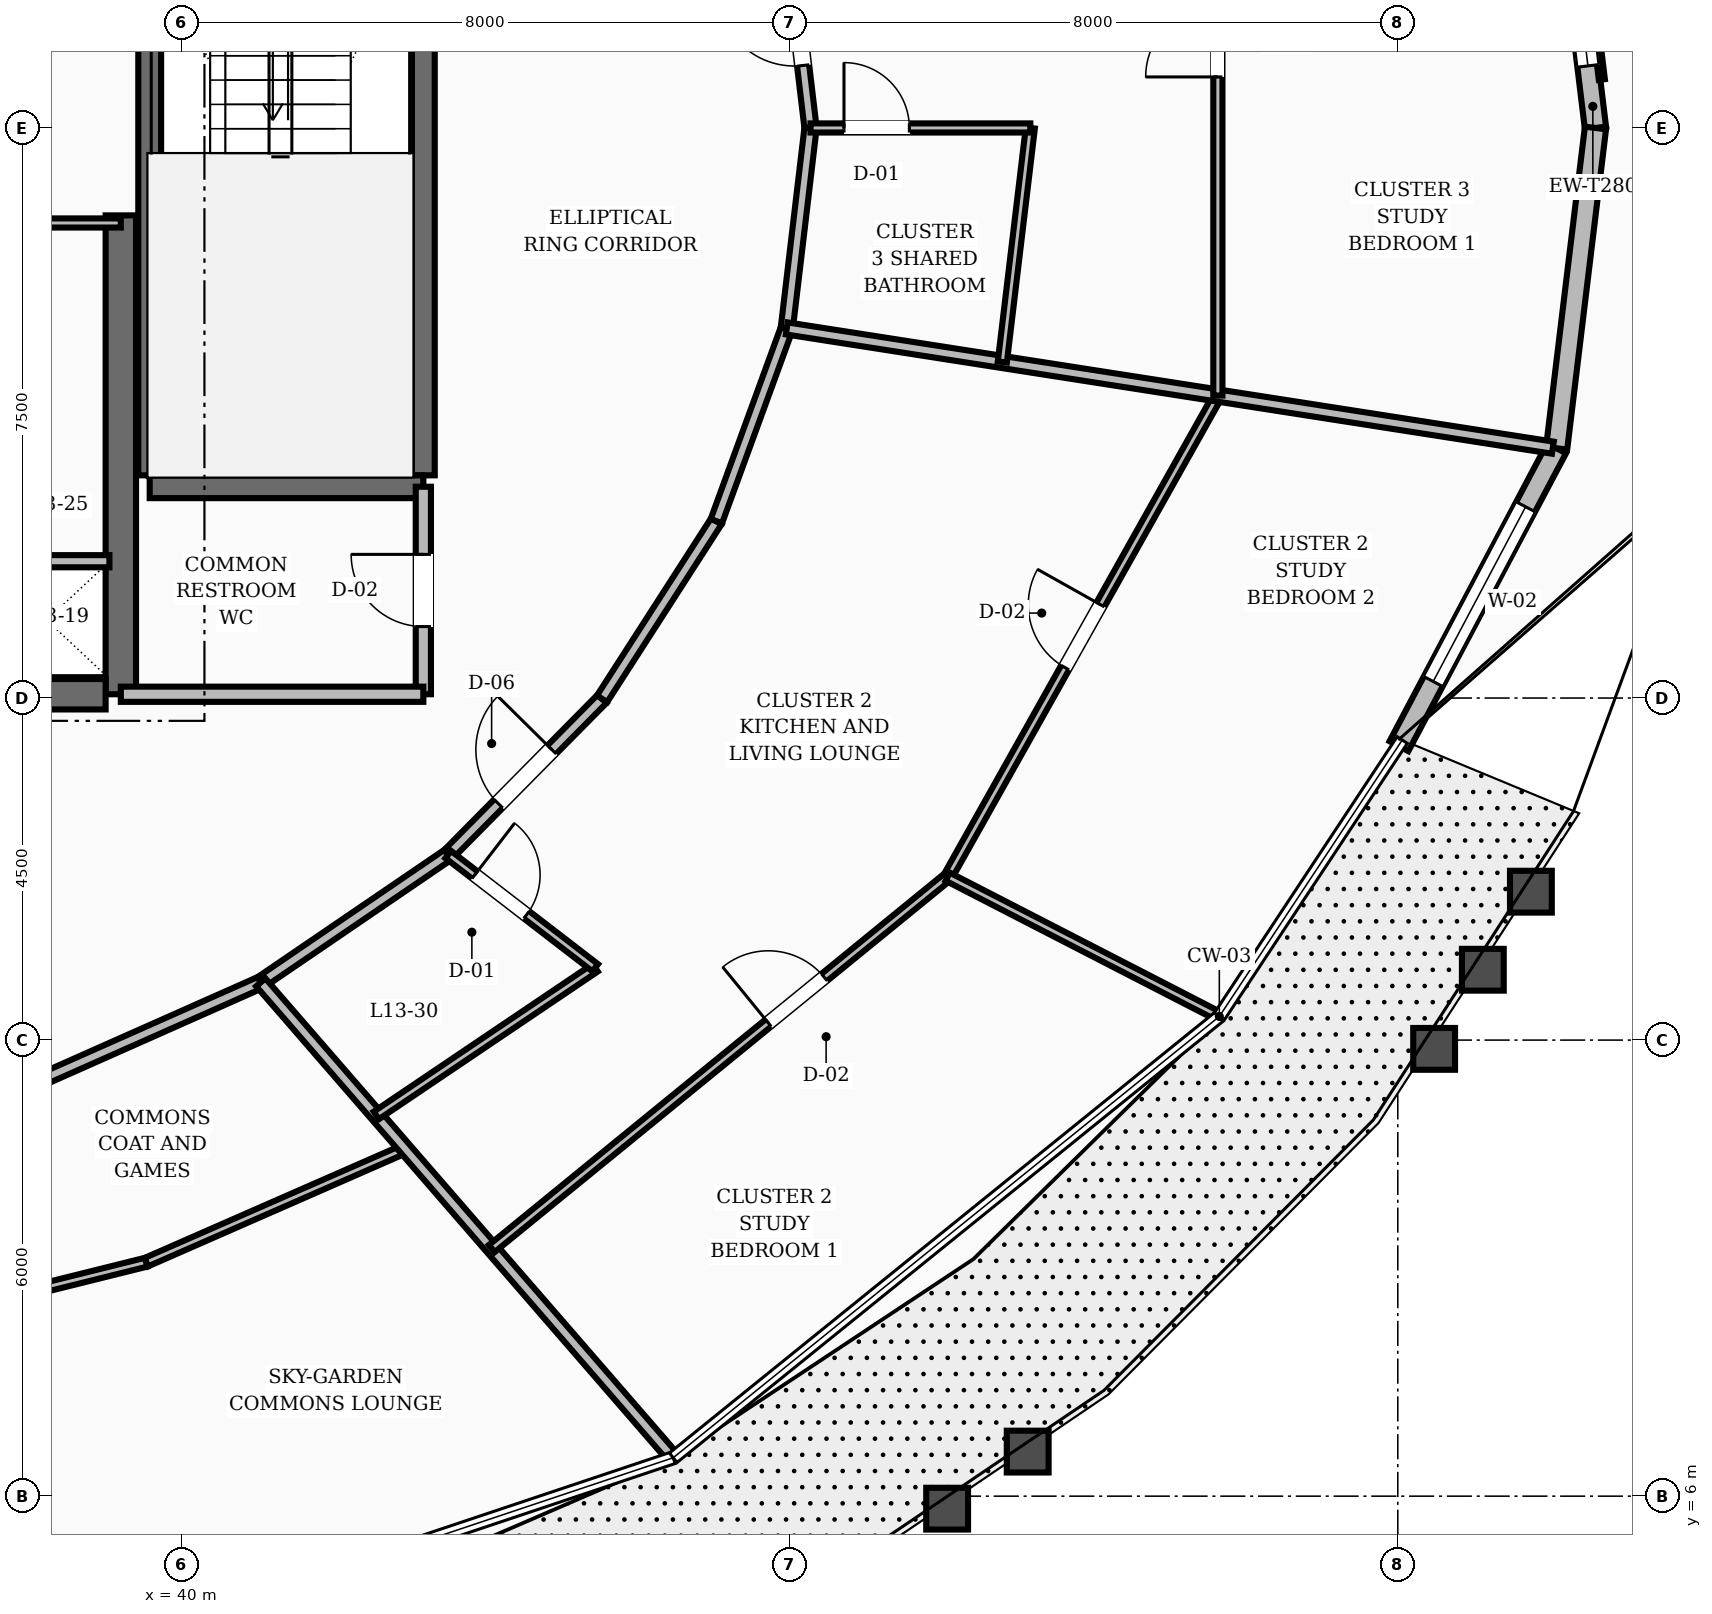
"""IFC4 building model, lengths in metres.
Left out: names, types, materials, properties, quantities, classifications, styles, units other than length and angle.
Written with IfcOpenShell. Run it as: python <this file> out.ifc"""

import sys

from ifc_helpers import new_model, si_unit, direction, frame, frame_2d, origin, place, context, subcontext, project, spatial, rectangle, extrude, element, fill, save


model = new_model("IFC4")
c1 = context("Model", 3, precision=1e-05, world=origin(), true_north=direction((0.0, 1.0)))
c2 = subcontext(c1, "Body", "Model", "MODEL_VIEW")
j1 = project(units=[si_unit("LENGTHUNIT", "METRE"), si_unit("PLANEANGLEUNIT", "RADIAN")], contexts=[c1])
p1 = place(None, origin())
s1 = spatial("IfcSite", under=j1, at=p1, CompositionType="ELEMENT")
p2 = place(p1, origin())
s2 = spatial("IfcBuilding", under=s1, at=p2, CompositionType="ELEMENT")
p3 = place(p2, frame((0.0, 0.0, 55.6)))
s3 = spatial("IfcBuildingStorey", under=s2, at=p3, CompositionType="ELEMENT", Elevation=55.6)
p4 = place(p3, frame((39.2, 16.55, 0.0), z_axis=(0.0, 0.0, 1.0), x_axis=(0.0, 1.0, 0.0)))
e1 = element("IfcWall", 1, at=p4, inside=s3, PredefinedType="SHEAR", context=c2, shape_type="SweptSolid", body=[
    extrude(rectangle(XDim=6.3, YDim=0.4, at=frame_2d((3.15, 0.0))), origin(), (0.0, 0.0, 1.0), 3.6),
])
p5 = place(p3, frame((35.8, 16.55, 0.0), z_axis=(0.0, 0.0, 1.0), x_axis=(1.0, 0.0, 0.0)))
e2 = element("IfcWall", 2, at=p5, inside=s3, PredefinedType="SHEAR", context=c2, shape_type="SweptSolid", body=[
    extrude(rectangle(XDim=3.2, YDim=0.4, at=frame_2d((1.6, 0.0))), origin(), (0.0, 0.0, 1.0), 3.6),
])
p6 = place(p5, frame((0.3, 0.0, 0.0)))
e3 = element("IfcOpeningElement", 3, at=p6, cuts=e2, PredefinedType="OPENING", context=c2, shape_type="SweptSolid", body=[
    extrude(rectangle(XDim=1.1, YDim=2.1, at=frame_2d((0.55, 1.05))), frame((0.0, 0.21, 0.0), z_axis=(0.0, -1.0, 0.0), x_axis=(1.0, 0.0, 0.0)), (0.0, 0.0, 1.0), 0.42),
])
for number, where, z_axis, x_axis in (
    (4, (43.18, 19.43, 0.0), (0.0, 0.0, 1.0), (0.0, 1.0, 0.0)),
    (5, (39.58, 19.43, 0.0), (0.0, 0.0, 1.0), (0.0, 1.0, 0.0)),
):
    element("IfcWall", number, at=place(p3, frame(where, z_axis=z_axis, x_axis=x_axis)), inside=s3, PredefinedType="SHEAR", context=c2, shape_type="SweptSolid", body=[
        extrude(rectangle(XDim=8.74, YDim=0.3, at=frame_2d((4.37, 0.0))), origin(), (0.0, 0.0, 1.0), 3.6),
    ])
p7 = place(p3, frame((39.58, 19.28, 0.0), z_axis=(0.0, 0.0, 1.0), x_axis=(1.0, 0.0, 0.0)))
e6 = element("IfcWall", 6, at=p7, inside=s3, PredefinedType="SHEAR", context=c2, shape_type="SweptSolid", body=[
    extrude(rectangle(XDim=3.6, YDim=0.3, at=frame_2d((1.8, 0.0))), origin(), (0.0, 0.0, 1.0), 3.6),
])
p8 = place(p3, frame((58.601, 24.0, 0.0), z_axis=(0.0, 0.0, 1.0), x_axis=(-0.120374306833, 0.992728576326, 0.0)))
e7 = element("IfcWall", 7, at=p8, inside=s3, PredefinedType="STANDARD", context=c2, shape_type="SweptSolid", body=[
    extrude(rectangle(XDim=4.245, YDim=0.28, at=frame_2d((2.123, 0.0))), origin(), (0.0, 0.0, 1.0), 2.65),
])
p9 = place(p8, frame((0.823, 0.0, 0.8)))
e8 = element("IfcOpeningElement", 8, at=p9, cuts=e7, PredefinedType="OPENING", context=c2, shape_type="SweptSolid", body=[
    extrude(rectangle(XDim=2.6, YDim=1.65, at=frame_2d((1.3, 0.825))), frame((0.0, 0.15, 0.0), z_axis=(0.0, -1.0, 0.0), x_axis=(1.0, 0.0, 0.0)), (0.0, 0.0, 1.0), 0.3),
])
p10 = place(p3, frame((56.015, 15.867, 0.0), z_axis=(0.0, 0.0, 1.0), x_axis=(0.467773880132, 0.883848175348, 0.0)))
e9 = element("IfcWall", 9, at=p10, inside=s3, PredefinedType="STANDARD", context=c2, shape_type="SweptSolid", body=[
    extrude(rectangle(XDim=4.434, YDim=0.28, at=frame_2d((2.217, 0.0))), origin(), (0.0, 0.0, 1.0), 2.65),
])
p11 = place(p10, frame((0.963, 0.0, 0.8)))
e10 = element("IfcOpeningElement", 10, at=p11, cuts=e9, PredefinedType="OPENING", context=c2, shape_type="SweptSolid", body=[
    extrude(rectangle(XDim=2.6, YDim=1.65, at=frame_2d((1.3, 0.825))), frame((0.0, 0.15, 0.0), z_axis=(0.0, -1.0, 0.0), x_axis=(1.0, 0.0, 0.0)), (0.0, 0.0, 1.0), 0.3),
])
p12 = place(p3, frame((58.09, 19.786, 0.0), z_axis=(0.0, 0.0, 1.0), x_axis=(0.120374306833, 0.992728576326, 0.0)))
e11 = element("IfcWall", 11, at=p12, inside=s3, PredefinedType="STANDARD", context=c2, shape_type="SweptSolid", body=[
    extrude(rectangle(XDim=4.245, YDim=0.28, at=frame_2d((2.123, 0.0))), origin(), (0.0, 0.0, 1.0), 2.65),
])
p13 = place(p3, frame((43.18, 16.55, 0.0), z_axis=(0.0, 0.0, 1.0), x_axis=(0.0, 1.0, 0.0)))
e12 = element("IfcWall", 12, at=p13, inside=s3, PredefinedType="SOLIDWALL", context=c2, shape_type="SweptSolid", body=[
    extrude(rectangle(XDim=2.73, YDim=0.2, at=frame_2d((1.365, 0.0))), origin(), (0.0, 0.0, 1.0), 2.61),
])
p14 = place(p13, frame((0.89, 0.0, 0.0)))
e13 = element("IfcOpeningElement", 13, at=p14, cuts=e12, PredefinedType="OPENING", context=c2, shape_type="SweptSolid", body=[
    extrude(rectangle(XDim=0.95, YDim=2.1, at=frame_2d((0.475, 1.05))), frame((0.0, 0.11, 0.0), z_axis=(0.0, -1.0, 0.0), x_axis=(1.0, 0.0, 0.0)), (0.0, 0.0, 1.0), 0.22),
])
p15 = place(p3, frame((39.2, 16.55, 0.0), z_axis=(0.0, 0.0, 1.0), x_axis=(1.0, 0.0, 0.0)))
e14 = element("IfcWall", 14, at=p15, inside=s3, PredefinedType="SOLIDWALL", context=c2, shape_type="SweptSolid", body=[
    extrude(rectangle(XDim=3.98, YDim=0.2, at=frame_2d((1.99, 0.0))), origin(), (0.0, 0.0, 1.0), 2.61),
])
p16 = place(p3, frame((37.4, 18.3, 0.0), z_axis=(0.0, 0.0, 1.0), x_axis=(1.0, 0.0, 0.0)))
e15 = element("IfcWall", 15, at=p16, inside=s3, PredefinedType="SOLIDWALL", context=c2, shape_type="SweptSolid", body=[
    extrude(rectangle(XDim=1.65, YDim=0.16, at=frame_2d((0.825, 0.0))), origin(), (0.0, 0.0, 1.0), 2.61),
])
p17 = place(p3, frame((37.4, 22.75, 0.0), z_axis=(0.0, 0.0, 1.0), x_axis=(1.0, 0.0, 0.0)))
e16 = element("IfcWall", 16, at=p17, inside=s3, PredefinedType="PARTITIONING", context=c2, shape_type="SweptSolid", body=[
    extrude(rectangle(XDim=1.8, YDim=0.12, at=frame_2d((0.9, 0.0))), origin(), (0.0, 0.0, 1.0), 2.61),
])
p18 = place(p3, frame((48.274, 24.0, 0.0), z_axis=(0.0, 0.0, 1.0), x_axis=(-0.117763961213, 0.99304161516, 0.0)))
e17 = element("IfcWall", 17, at=p18, inside=s3, PredefinedType="SOLIDWALL", context=c2, shape_type="SweptSolid", body=[
    extrude(rectangle(XDim=2.656, YDim=0.16, at=frame_2d((1.328, 0.0))), origin(), (0.0, 0.0, 1.0), 2.61),
])
p19 = place(p18, frame((0.828, 0.0, 0.0)))
e18 = element("IfcOpeningElement", 18, at=p19, cuts=e17, PredefinedType="OPENING", context=c2, shape_type="SweptSolid", body=[
    extrude(rectangle(XDim=1.0, YDim=2.1, at=frame_2d((0.5, 1.05))), frame((0.0, 0.09, 0.0), z_axis=(0.0, -1.0, 0.0), x_axis=(1.0, 0.0, 0.0)), (0.0, 0.0, 1.0), 0.18),
])
p20 = place(p3, frame((38.228, 11.511, 0.0), z_axis=(0.0, 0.0, 1.0), x_axis=(0.913952123493, 0.405822024984, 0.0)))
e19 = element("IfcWall", 19, at=p20, inside=s3, PredefinedType="SOLIDWALL", context=c2, shape_type="SweptSolid", body=[
    extrude(rectangle(XDim=3.078, YDim=0.16, at=frame_2d((1.539, 0.0))), origin(), (0.0, 0.0, 1.0), 2.61),
])
p21 = place(p3, frame((41.041, 12.76, 0.0), z_axis=(0.0, 0.0, 1.0), x_axis=(0.826293096206, 0.56324037423, 0.0)))
e20 = element("IfcWall", 20, at=p21, inside=s3, PredefinedType="SOLIDWALL", context=c2, shape_type="SweptSolid", body=[
    extrude(rectangle(XDim=2.985, YDim=0.16, at=frame_2d((1.492, 0.0))), origin(), (0.0, 0.0, 1.0), 2.61),
])
p22 = place(p3, frame((43.508, 14.441, 0.0), z_axis=(0.0, 0.0, 1.0), x_axis=(0.702811997, 0.711375636969, 0.0)))
e21 = element("IfcWall", 21, at=p22, inside=s3, PredefinedType="SOLIDWALL", context=c2, shape_type="SweptSolid", body=[
    extrude(rectangle(XDim=2.879, YDim=0.16, at=frame_2d((1.44, 0.0))), origin(), (0.0, 0.0, 1.0), 2.61),
])
p23 = place(p22, frame((0.94, 0.0, 0.0)))
e22 = element("IfcOpeningElement", 22, at=p23, cuts=e21, PredefinedType="OPENING", context=c2, shape_type="SweptSolid", body=[
    extrude(rectangle(XDim=1.0, YDim=2.1, at=frame_2d((0.5, 1.05))), frame((0.0, 0.09, 0.0), z_axis=(0.0, -1.0, 0.0), x_axis=(1.0, 0.0, 0.0)), (0.0, 0.0, 1.0), 0.18),
])
p24 = place(p3, frame((45.531, 16.49, 0.0), z_axis=(0.0, 0.0, 1.0), x_axis=(0.541126045017, 0.840941498206, 0.0)))
e23 = element("IfcWall", 23, at=p24, inside=s3, PredefinedType="SOLIDWALL", context=c2, shape_type="SweptSolid", body=[
    extrude(rectangle(XDim=2.779, YDim=0.16, at=frame_2d((1.39, 0.0))), origin(), (0.0, 0.0, 1.0), 2.61),
])
p25 = place(p3, frame((47.035, 18.827, 0.0), z_axis=(0.0, 0.0, 1.0), x_axis=(0.343013437329, 0.939330496583, 0.0)))
e24 = element("IfcWall", 24, at=p25, inside=s3, PredefinedType="SOLIDWALL", context=c2, shape_type="SweptSolid", body=[
    extrude(rectangle(XDim=2.7, YDim=0.16, at=frame_2d((1.35, 0.0))), origin(), (0.0, 0.0, 1.0), 2.61),
])
p26 = place(p3, frame((47.961, 21.363, 0.0), z_axis=(0.0, 0.0, 1.0), x_axis=(0.117763961213, 0.99304161516, 0.0)))
e25 = element("IfcWall", 25, at=p26, inside=s3, PredefinedType="SOLIDWALL", context=c2, shape_type="SweptSolid", body=[
    extrude(rectangle(XDim=2.656, YDim=0.16, at=frame_2d((1.328, 0.0))), origin(), (0.0, 0.0, 1.0), 2.61),
])
p27 = place(p3, frame((35.842, 8.159, 0.0), z_axis=(0.0, 0.0, 1.0), x_axis=(0.970409761788, 0.241464064049, 0.0)))
e26 = element("IfcWall", 26, at=p27, inside=s3, PredefinedType="PARTITIONING", context=c2, shape_type="SweptSolid", body=[
    extrude(rectangle(XDim=3.807, YDim=0.12, at=frame_2d((1.903, 0.0))), origin(), (0.0, 0.0, 1.0), 2.61),
])
p28 = place(p3, frame((39.536, 9.079, 0.0), z_axis=(0.0, 0.0, 1.0), x_axis=(0.915866176648, 0.401483681452, 0.0)))
e27 = element("IfcWall", 27, at=p28, inside=s3, PredefinedType="PARTITIONING", context=c2, shape_type="SweptSolid", body=[
    extrude(rectangle(XDim=3.717, YDim=0.12, at=frame_2d((1.859, 0.0))), origin(), (0.0, 0.0, 1.0), 2.61),
])
p29 = place(p3, frame((41.041, 12.76, 0.0), z_axis=(0.0, 0.0, 1.0), x_axis=(0.655291843771, -0.755375800173, 0.0)))
e28 = element("IfcWall", 28, at=p29, inside=s3, PredefinedType="SOLIDWALL", context=c2, shape_type="SweptSolid", body=[
    extrude(rectangle(XDim=8.23, YDim=0.16, at=frame_2d((4.115, 0.0))), origin(), (0.0, 0.0, 1.0), 2.61),
])
p30 = place(p3, frame((42.561, 11.009, 0.0), z_axis=(0.0, 0.0, 1.0), x_axis=(0.829022132353, 0.55921579383, 0.0)))
e29 = element("IfcWall", 29, at=p30, inside=s3, PredefinedType="PARTITIONING", context=c2, shape_type="SweptSolid", body=[
    extrude(rectangle(XDim=3.475, YDim=0.12, at=frame_2d((1.737, 0.0))), origin(), (0.0, 0.0, 1.0), 2.61),
])
p31 = place(p3, frame((43.508, 14.441, 0.0), z_axis=(0.0, 0.0, 1.0), x_axis=(0.792203618537, -0.610256853118, 0.0)))
e30 = element("IfcWall", 30, at=p31, inside=s3, PredefinedType="PARTITIONING", context=c2, shape_type="SweptSolid", body=[
    extrude(rectangle(XDim=2.441, YDim=0.12, at=frame_2d((1.22, 0.0))), origin(), (0.0, 0.0, 1.0), 2.61),
])
p32 = place(p31, frame((0.44, 0.0, 0.0)))
e31 = element("IfcOpeningElement", 31, at=p32, cuts=e30, PredefinedType="OPENING", context=c2, shape_type="SweptSolid", body=[
    extrude(rectangle(XDim=0.86, YDim=2.1, at=frame_2d((0.43, 1.05))), frame((0.0, 0.07, 0.0), z_axis=(0.0, -1.0, 0.0), x_axis=(1.0, 0.0, 0.0)), (0.0, 0.0, 1.0), 0.14),
])
p33 = place(p3, frame((44.08, 9.258, 0.0), z_axis=(0.0, 0.0, 1.0), x_axis=(0.774997536741, 0.631964253772, 0.0)))
e32 = element("IfcWall", 32, at=p33, inside=s3, PredefinedType="PARTITIONING", context=c2, shape_type="SweptSolid", body=[
    extrude(rectangle(XDim=7.741, YDim=0.12, at=frame_2d((3.87, 0.0))), origin(), (0.0, 0.0, 1.0), 2.61),
])
p34 = place(p33, frame((4.696, 0.0, 0.0)))
e33 = element("IfcOpeningElement", 33, at=p34, cuts=e32, PredefinedType="OPENING", context=c2, shape_type="SweptSolid", body=[
    extrude(rectangle(XDim=0.95, YDim=2.1, at=frame_2d((0.475, 1.05))), frame((0.0, 0.07, 0.0), z_axis=(0.0, -1.0, 0.0), x_axis=(1.0, 0.0, 0.0)), (0.0, 0.0, 1.0), 0.14),
])
p35 = place(p3, frame((50.079, 14.149, 0.0), z_axis=(0.0, 0.0, 1.0), x_axis=(0.489569746755, 0.871964140927, 0.0)))
e34 = element("IfcWall", 34, at=p35, inside=s3, PredefinedType="PARTITIONING", context=c2, shape_type="SweptSolid", body=[
    extrude(rectangle(XDim=7.26, YDim=0.12, at=frame_2d((3.63, 0.0))), origin(), (0.0, 0.0, 1.0), 2.61),
])
p36 = place(p35, frame((3.155, 0.0, 0.0)))
e35 = element("IfcOpeningElement", 35, at=p36, cuts=e34, PredefinedType="OPENING", context=c2, shape_type="SweptSolid", body=[
    extrude(rectangle(XDim=0.95, YDim=2.1, at=frame_2d((0.475, 1.05))), frame((0.0, 0.07, 0.0), z_axis=(0.0, -1.0, 0.0), x_axis=(1.0, 0.0, 0.0)), (0.0, 0.0, 1.0), 0.14),
])
p37 = place(p3, frame((50.079, 14.149, 0.0), z_axis=(0.0, 0.0, 1.0), x_axis=(0.889149798014, -0.457616254838, 0.0)))
e36 = element("IfcWall", 36, at=p37, inside=s3, PredefinedType="PARTITIONING", context=c2, shape_type="SweptSolid", body=[
    extrude(rectangle(XDim=3.969, YDim=0.12, at=frame_2d((1.984, 0.0))), origin(), (0.0, 0.0, 1.0), 2.61),
])
p38 = place(p3, frame((47.961, 21.363, 0.0), z_axis=(0.0, 0.0, 1.0), x_axis=(0.988098124705, -0.153824887305, 0.0)))
e37 = element("IfcWall", 37, at=p38, inside=s3, PredefinedType="SOLIDWALL", context=c2, shape_type="SweptSolid", body=[
    extrude(rectangle(XDim=10.2, YDim=0.16, at=frame_2d((5.1, 0.0))), origin(), (0.0, 0.0, 1.0), 2.61),
])
p39 = place(p3, frame((50.797, 20.921, 0.0), z_axis=(0.0, 0.0, 1.0), x_axis=(0.118819199309, 0.992915906749, 0.0)))
e38 = element("IfcWall", 38, at=p39, inside=s3, PredefinedType="PARTITIONING", context=c2, shape_type="SweptSolid", body=[
    extrude(rectangle(XDim=3.101, YDim=0.12, at=frame_2d((1.55, 0.0))), origin(), (0.0, 0.0, 1.0), 2.61),
])
p40 = place(p3, frame((48.274, 24.0, 0.0), z_axis=(0.0, 0.0, 1.0), x_axis=(1.0, 0.0, 0.0)))
e39 = element("IfcWall", 39, at=p40, inside=s3, PredefinedType="PARTITIONING", context=c2, shape_type="SweptSolid", body=[
    extrude(rectangle(XDim=2.892, YDim=0.12, at=frame_2d((1.446, 0.0))), origin(), (0.0, 0.0, 1.0), 2.61),
])
p41 = place(p40, frame((0.44, 0.0, 0.0)))
e40 = element("IfcOpeningElement", 40, at=p41, cuts=e39, PredefinedType="OPENING", context=c2, shape_type="SweptSolid", body=[
    extrude(rectangle(XDim=0.86, YDim=2.1, at=frame_2d((0.43, 1.05))), frame((0.0, 0.07, 0.0), z_axis=(0.0, -1.0, 0.0), x_axis=(1.0, 0.0, 0.0)), (0.0, 0.0, 1.0), 0.14),
])
p42 = place(p3, frame((53.633, 20.48, 0.0), z_axis=(0.0, 0.0, 1.0), x_axis=(0.0, 1.0, 0.0)))
e41 = element("IfcWall", 41, at=p42, inside=s3, PredefinedType="PARTITIONING", context=c2, shape_type="SweptSolid", body=[
    extrude(rectangle(XDim=7.041, YDim=0.12, at=frame_2d((3.52, 0.0))), origin(), (0.0, 0.0, 1.0), 2.61),
])
p43 = place(p42, frame((4.192, 0.0, 0.0)))
e42 = element("IfcOpeningElement", 42, at=p43, cuts=e41, PredefinedType="OPENING", context=c2, shape_type="SweptSolid", body=[
    extrude(rectangle(XDim=0.95, YDim=2.1, at=frame_2d((0.475, 1.05))), frame((0.0, 0.07, 0.0), z_axis=(0.0, -1.0, 0.0), x_axis=(1.0, 0.0, 0.0)), (0.0, 0.0, 1.0), 0.14),
])
p44 = place(p9, origin())
e43 = element("IfcWindow", 43, at=p44, inside=s3, PartitioningType="SINGLE_PANEL", PredefinedType="WINDOW", context=c2, shape_type="SweptSolid", body=[
    extrude(rectangle(XDim=2.6, YDim=1.65, at=frame_2d((1.3, 0.825))), frame((0.0, 0.03, 0.0), z_axis=(0.0, -1.0, 0.0), x_axis=(1.0, 0.0, 0.0)), (0.0, 0.0, 1.0), 0.06),
])
fill(e8, e43)
p45 = place(p11, origin())
e44 = element("IfcWindow", 44, at=p45, inside=s3, PartitioningType="SINGLE_PANEL", PredefinedType="WINDOW", context=c2, shape_type="SweptSolid", body=[
    extrude(rectangle(XDim=2.6, YDim=1.65, at=frame_2d((1.3, 0.825))), frame((0.0, 0.03, 0.0), z_axis=(0.0, -1.0, 0.0), x_axis=(1.0, 0.0, 0.0)), (0.0, 0.0, 1.0), 0.06),
])
fill(e10, e44)
p46 = place(p14, origin())
e45 = element("IfcDoor", 45, at=p46, inside=s3, OperationType="SINGLE_SWING_RIGHT", PredefinedType="DOOR", context=c2, shape_type="SweptSolid", body=[
    extrude(rectangle(XDim=0.95, YDim=2.1, at=frame_2d((0.475, 1.05))), frame((0.0, 0.025, 0.0), z_axis=(0.0, -1.0, 0.0), x_axis=(1.0, 0.0, 0.0)), (0.0, 0.0, 1.0), 0.05),
])
fill(e13, e45)
p47 = place(p32, origin())
e46 = element("IfcDoor", 46, at=p47, inside=s3, OperationType="SINGLE_SWING_LEFT", PredefinedType="DOOR", context=c2, shape_type="SweptSolid", body=[
    extrude(rectangle(XDim=0.86, YDim=2.1, at=frame_2d((0.43, 1.05))), frame((0.0, 0.025, 0.0), z_axis=(0.0, -1.0, 0.0), x_axis=(1.0, 0.0, 0.0)), (0.0, 0.0, 1.0), 0.05),
])
fill(e31, e46)
p48 = place(p23, origin())
e47 = element("IfcDoor", 47, at=p48, inside=s3, OperationType="SINGLE_SWING_RIGHT", PredefinedType="DOOR", context=c2, shape_type="SweptSolid", body=[
    extrude(rectangle(XDim=1.0, YDim=2.1, at=frame_2d((0.5, 1.05))), frame((0.0, 0.025, 0.0), z_axis=(0.0, -1.0, 0.0), x_axis=(1.0, 0.0, 0.0)), (0.0, 0.0, 1.0), 0.05),
])
fill(e22, e47)
p49 = place(p34, origin())
e48 = element("IfcDoor", 48, at=p49, inside=s3, OperationType="SINGLE_SWING_LEFT", PredefinedType="DOOR", context=c2, shape_type="SweptSolid", body=[
    extrude(rectangle(XDim=0.95, YDim=2.1, at=frame_2d((0.475, 1.05))), frame((0.0, 0.025, 0.0), z_axis=(0.0, -1.0, 0.0), x_axis=(1.0, 0.0, 0.0)), (0.0, 0.0, 1.0), 0.05),
])
fill(e33, e48)
p50 = place(p36, origin())
e49 = element("IfcDoor", 49, at=p50, inside=s3, OperationType="SINGLE_SWING_RIGHT", PredefinedType="DOOR", context=c2, shape_type="SweptSolid", body=[
    extrude(rectangle(XDim=0.95, YDim=2.1, at=frame_2d((0.475, 1.05))), frame((0.0, 0.025, 0.0), z_axis=(0.0, -1.0, 0.0), x_axis=(1.0, 0.0, 0.0)), (0.0, 0.0, 1.0), 0.05),
])
fill(e35, e49)
p51 = place(p41, origin())
e50 = element("IfcDoor", 50, at=p51, inside=s3, OperationType="SINGLE_SWING_LEFT", PredefinedType="DOOR", context=c2, shape_type="SweptSolid", body=[
    extrude(rectangle(XDim=0.86, YDim=2.1, at=frame_2d((0.43, 1.05))), frame((0.0, 0.025, 0.0), z_axis=(0.0, -1.0, 0.0), x_axis=(1.0, 0.0, 0.0)), (0.0, 0.0, 1.0), 0.05),
])
fill(e40, e50)
p52 = place(p19, origin())
e51 = element("IfcDoor", 51, at=p52, inside=s3, OperationType="SINGLE_SWING_RIGHT", PredefinedType="DOOR", context=c2, shape_type="SweptSolid", body=[
    extrude(rectangle(XDim=1.0, YDim=2.1, at=frame_2d((0.5, 1.05))), frame((0.0, 0.025, 0.0), z_axis=(0.0, -1.0, 0.0), x_axis=(1.0, 0.0, 0.0)), (0.0, 0.0, 1.0), 0.05),
])
fill(e18, e51)
p53 = place(p43, origin())
e52 = element("IfcDoor", 52, at=p53, inside=s3, OperationType="SINGLE_SWING_LEFT", PredefinedType="DOOR", context=c2, shape_type="SweptSolid", body=[
    extrude(rectangle(XDim=0.95, YDim=2.1, at=frame_2d((0.475, 1.05))), frame((0.0, 0.025, 0.0), z_axis=(0.0, -1.0, 0.0), x_axis=(1.0, 0.0, 0.0)), (0.0, 0.0, 1.0), 0.05),
])
fill(e42, e52)
save(model, sys.argv[1])
